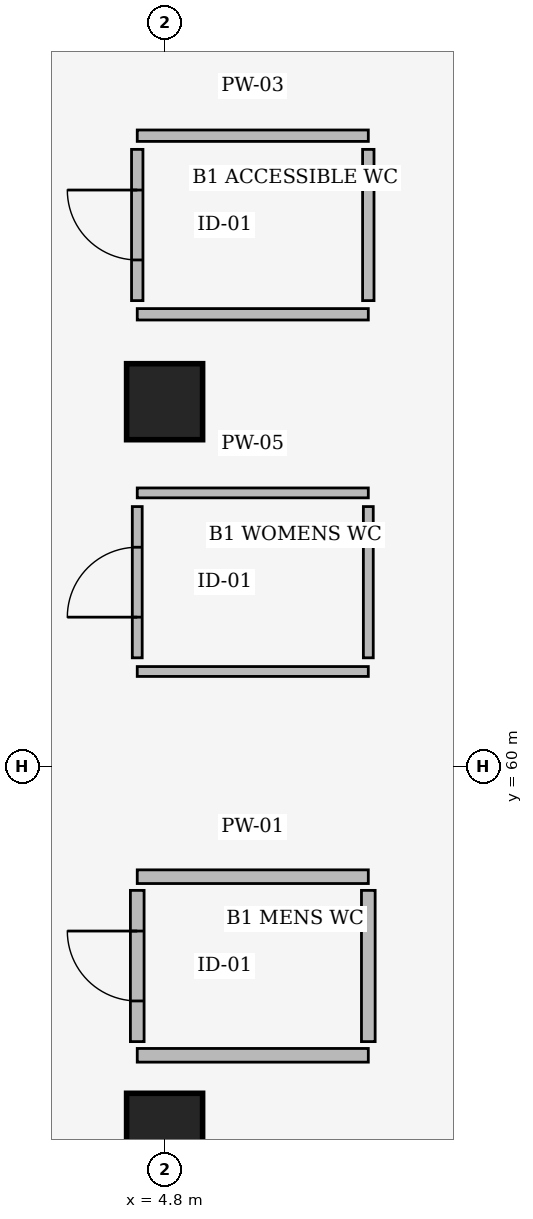
"""IFC4 building model, lengths in metres.
Left out: names, types, materials, properties, quantities, classifications, styles, units other than length and angle.
Written with IfcOpenShell. Run it as: python <this file> out.ifc"""

import sys

from ifc_helpers import new_model, si_unit, direction, frame, frame_2d, origin, origin_2d, place, context, subcontext, project, spatial, rectangle, extrude, element, fill, save


model = new_model("IFC4")
c1 = context("Model", 3, precision=1e-05, world=origin(), true_north=direction((0.0, 1.0)))
c2 = subcontext(c1, "Body", "Model", "MODEL_VIEW")
j1 = project(units=[si_unit("LENGTHUNIT", "METRE"), si_unit("PLANEANGLEUNIT", "RADIAN")], contexts=[c1])
p1 = place(None, origin())
s1 = spatial("IfcSite", under=j1, at=p1, CompositionType="ELEMENT")
p2 = place(p1, origin())
s2 = spatial("IfcBuilding", under=s1, at=p2, CompositionType="ELEMENT")
p3 = place(p2, frame((0.0, 0.0, -4.8)))
s3 = spatial("IfcBuildingStorey", under=s2, at=p3, CompositionType="ELEMENT", Elevation=-4.8)
for number, where, z_axis, x_axis in (
    (1, (4.8, 55.2, 0.0), (0.0, 0.0, 1.0), (1.0, 0.0, 0.0)),
    (2, (4.8, 64.8, 0.0), (0.0, 0.0, 1.0), (1.0, 0.0, 0.0)),
):
    element("IfcColumn", number, at=place(p3, frame(where, z_axis=z_axis, x_axis=x_axis)), inside=s3, PredefinedType="COLUMN", context=c2, shape_type="SweptSolid", body=[
        extrude(rectangle(XDim=1.0, YDim=1.0, at=origin_2d()), origin(), (0.0, 0.0, 1.0), 4.8),
    ])
for number, where, z_axis, x_axis in (
    (3, (4.44, 58.55, 0.0), (0.0, 0.0, 1.0), (1.0, 0.0, 0.0)),
    (4, (4.44, 56.2, 0.0), (0.0, 0.0, 1.0), (1.0, 0.0, 0.0)),
):
    element("IfcWall", number, at=place(p3, frame(where, z_axis=z_axis, x_axis=x_axis)), inside=s3, PredefinedType="PARTITIONING", context=c2, shape_type="SweptSolid", body=[
        extrude(rectangle(XDim=3.04, YDim=0.18, at=frame_2d((1.52, 0.0))), origin(), (0.0, 0.0, 1.0), 3.466),
    ])
p4 = place(p3, frame((4.44, 56.38, 0.0), z_axis=(0.0, 0.0, 1.0), x_axis=(0.0, 1.0, 0.0)))
e5 = element("IfcWall", 5, at=p4, inside=s3, PredefinedType="PARTITIONING", context=c2, shape_type="SweptSolid", body=[
    extrude(rectangle(XDim=1.99, YDim=0.18, at=frame_2d((0.995, 0.0))), origin(), (0.0, 0.0, 1.0), 3.466),
])
p5 = place(p4, frame((0.535, 0.0, 0.0)))
e6 = element("IfcOpeningElement", 6, at=p5, cuts=e5, PredefinedType="OPENING", context=c2, shape_type="SweptSolid", body=[
    extrude(rectangle(XDim=0.92, YDim=2.12, at=frame_2d((0.46, 1.06))), frame((0.0, 0.1, 0.0), z_axis=(0.0, -1.0, 0.0), x_axis=(1.0, 0.0, 0.0)), (0.0, 0.0, 1.0), 0.2),
])
p6 = place(p3, frame((7.48, 56.38, 0.0), z_axis=(0.0, 0.0, 1.0), x_axis=(0.0, 1.0, 0.0)))
e7 = element("IfcWall", 7, at=p6, inside=s3, PredefinedType="PARTITIONING", context=c2, shape_type="SweptSolid", body=[
    extrude(rectangle(XDim=1.99, YDim=0.18, at=frame_2d((0.995, 0.0))), origin(), (0.0, 0.0, 1.0), 4.44),
])
for number, where, z_axis, x_axis in (
    (8, (4.44, 63.6, 0.0), (0.0, 0.0, 1.0), (1.0, 0.0, 0.0)),
    (9, (4.44, 61.25, 0.0), (0.0, 0.0, 1.0), (1.0, 0.0, 0.0)),
):
    element("IfcWall", number, at=place(p3, frame(where, z_axis=z_axis, x_axis=x_axis)), inside=s3, PredefinedType="PARTITIONING", context=c2, shape_type="SweptSolid", body=[
        extrude(rectangle(XDim=3.04, YDim=0.13, at=frame_2d((1.52, 0.0))), origin(), (0.0, 0.0, 1.0), 3.466),
    ])
p7 = place(p3, frame((4.44, 61.43, 0.0), z_axis=(0.0, 0.0, 1.0), x_axis=(0.0, 1.0, 0.0)))
e10 = element("IfcWall", 10, at=p7, inside=s3, PredefinedType="PARTITIONING", context=c2, shape_type="SweptSolid", body=[
    extrude(rectangle(XDim=1.99, YDim=0.13, at=frame_2d((0.995, 0.0))), origin(), (0.0, 0.0, 1.0), 3.466),
])
p8 = place(p7, frame((0.535, 0.0, 0.0)))
e11 = element("IfcOpeningElement", 11, at=p8, cuts=e10, PredefinedType="OPENING", context=c2, shape_type="SweptSolid", body=[
    extrude(rectangle(XDim=0.92, YDim=2.12, at=frame_2d((0.46, 1.06))), frame((0.0, 0.075, 0.0), z_axis=(0.0, -1.0, 0.0), x_axis=(1.0, 0.0, 0.0)), (0.0, 0.0, 1.0), 0.15),
])
p9 = place(p3, frame((7.48, 61.43, 0.0), z_axis=(0.0, 0.0, 1.0), x_axis=(0.0, 1.0, 0.0)))
e12 = element("IfcWall", 12, at=p9, inside=s3, PredefinedType="PARTITIONING", context=c2, shape_type="SweptSolid", body=[
    extrude(rectangle(XDim=1.99, YDim=0.13, at=frame_2d((0.995, 0.0))), origin(), (0.0, 0.0, 1.0), 4.44),
])
for number, where, z_axis, x_axis in (
    (13, (4.44, 68.3, 0.0), (0.0, 0.0, 1.0), (1.0, 0.0, 0.0)),
    (14, (4.44, 65.95, 0.0), (0.0, 0.0, 1.0), (1.0, 0.0, 0.0)),
):
    element("IfcWall", number, at=place(p3, frame(where, z_axis=z_axis, x_axis=x_axis)), inside=s3, PredefinedType="PARTITIONING", context=c2, shape_type="SweptSolid", body=[
        extrude(rectangle(XDim=3.04, YDim=0.15, at=frame_2d((1.52, 0.0))), origin(), (0.0, 0.0, 1.0), 3.166),
    ])
p10 = place(p3, frame((4.44, 66.13, 0.0), z_axis=(0.0, 0.0, 1.0), x_axis=(0.0, 1.0, 0.0)))
e15 = element("IfcWall", 15, at=p10, inside=s3, PredefinedType="PARTITIONING", context=c2, shape_type="SweptSolid", body=[
    extrude(rectangle(XDim=1.99, YDim=0.15, at=frame_2d((0.995, 0.0))), origin(), (0.0, 0.0, 1.0), 3.166),
])
p11 = place(p10, frame((0.535, 0.0, 0.0)))
e16 = element("IfcOpeningElement", 16, at=p11, cuts=e15, PredefinedType="OPENING", context=c2, shape_type="SweptSolid", body=[
    extrude(rectangle(XDim=0.92, YDim=2.12, at=frame_2d((0.46, 1.06))), frame((0.0, 0.085, 0.0), z_axis=(0.0, -1.0, 0.0), x_axis=(1.0, 0.0, 0.0)), (0.0, 0.0, 1.0), 0.17),
])
p12 = place(p3, frame((7.48, 66.13, 0.0), z_axis=(0.0, 0.0, 1.0), x_axis=(0.0, 1.0, 0.0)))
e17 = element("IfcWall", 17, at=p12, inside=s3, PredefinedType="PARTITIONING", context=c2, shape_type="SweptSolid", body=[
    extrude(rectangle(XDim=1.99, YDim=0.15, at=frame_2d((0.995, 0.0))), origin(), (0.0, 0.0, 1.0), 4.44),
])
p13 = place(p5, origin())
e18 = element("IfcDoor", 18, at=p13, inside=s3, OperationType="SINGLE_SWING_RIGHT", PredefinedType="DOOR", context=c2, shape_type="SweptSolid", body=[
    extrude(rectangle(XDim=0.92, YDim=2.12, at=frame_2d((0.46, 1.06))), frame((0.0, 0.025, 0.0), z_axis=(0.0, -1.0, 0.0), x_axis=(1.0, 0.0, 0.0)), (0.0, 0.0, 1.0), 0.05),
])
fill(e6, e18)
p14 = place(p8, origin())
e19 = element("IfcDoor", 19, at=p14, inside=s3, OperationType="SINGLE_SWING_LEFT", PredefinedType="DOOR", context=c2, shape_type="SweptSolid", body=[
    extrude(rectangle(XDim=0.92, YDim=2.12, at=frame_2d((0.46, 1.06))), frame((0.0, 0.025, 0.0), z_axis=(0.0, -1.0, 0.0), x_axis=(1.0, 0.0, 0.0)), (0.0, 0.0, 1.0), 0.05),
])
fill(e11, e19)
p15 = place(p11, origin())
e20 = element("IfcDoor", 20, at=p15, inside=s3, OperationType="SINGLE_SWING_RIGHT", PredefinedType="DOOR", context=c2, shape_type="SweptSolid", body=[
    extrude(rectangle(XDim=0.92, YDim=2.12, at=frame_2d((0.46, 1.06))), frame((0.0, 0.025, 0.0), z_axis=(0.0, -1.0, 0.0), x_axis=(1.0, 0.0, 0.0)), (0.0, 0.0, 1.0), 0.05),
])
fill(e16, e20)
save(model, sys.argv[1])
